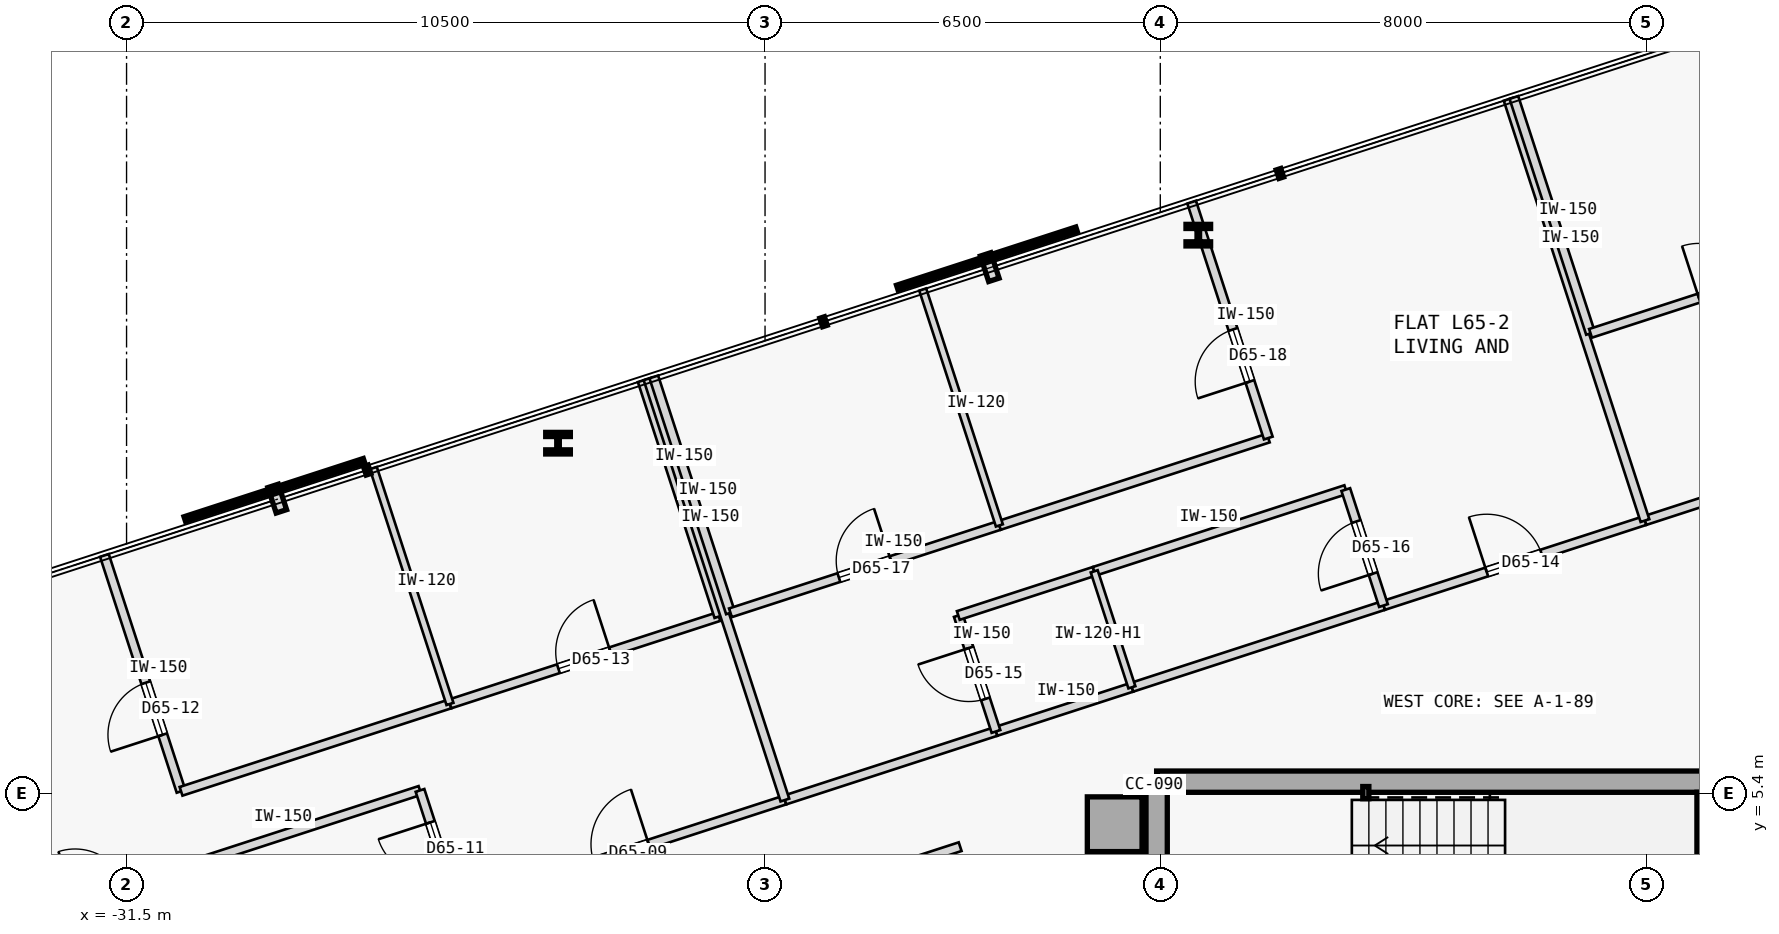
"""IFC4 building model, lengths in metres.
Left out: names, types, materials, properties, quantities, classifications, styles, units other than length and angle.
Written with IfcOpenShell. Run it as: python <this file> out.ifc"""

import sys

from ifc_helpers import new_model, si_unit, direction, frame, frame_2d, origin, origin_2d, place, context, subcontext, project, spatial, rectangle, hollow_rectangle, i_section, extrude, element, fill, save


model = new_model("IFC4")
c1 = context("Model", 3, precision=1e-05, world=origin(), true_north=direction((0.0, 1.0)))
c2 = subcontext(c1, "Body", "Model", "MODEL_VIEW")
j1 = project(units=[si_unit("LENGTHUNIT", "METRE"), si_unit("PLANEANGLEUNIT", "RADIAN")], contexts=[c1])
p1 = place(None, origin())
s1 = spatial("IfcSite", under=j1, at=p1, CompositionType="ELEMENT")
p2 = place(p1, origin())
s2 = spatial("IfcBuilding", under=s1, at=p2, CompositionType="ELEMENT")
p3 = place(p2, frame((0.0, 0.0, 244.4)))
s3 = spatial("IfcBuildingStorey", under=s2, at=p3, CompositionType="ELEMENT", Elevation=244.4)
p4 = place(p3, frame((-15.25, 4.9, 0.0), z_axis=(0.0, 0.0, 1.0), x_axis=(1.0, 0.0, 0.0)))
e1 = element("IfcColumn", 1, at=p4, inside=s3, PredefinedType="COLUMN", context=c2, shape_type="SweptSolid", body=[
    extrude(rectangle(XDim=0.9, YDim=0.9, at=origin_2d()), origin(), (0.0, 0.0, 1.0), 3.35),
])
p5 = place(p3, frame((-14.56, 5.6, 0.0), z_axis=(0.0, 0.0, 1.0), x_axis=(1.0, 0.0, 0.0)))
e2 = element("IfcWall", 2, at=p5, inside=s3, PredefinedType="SHEAR", context=c2, shape_type="SweptSolid", body=[
    extrude(rectangle(XDim=11.41, YDim=0.35, at=frame_2d((5.705, 0.0))), origin(), (0.0, 0.0, 1.0), 3.125),
])
p6 = place(p3, frame((-14.56, -5.425, 0.0), z_axis=(0.0, 0.0, 1.0), x_axis=(0.0, 1.0, 0.0)))
e3 = element("IfcWall", 3, at=p6, inside=s3, PredefinedType="SHEAR", context=c2, shape_type="SweptSolid", body=[
    extrude(rectangle(XDim=10.85, YDim=0.35, at=frame_2d((5.425, 0.0))), origin(), (0.0, 0.0, 1.0), 3.125),
])
p7 = place(p3, frame((-5.5, 2.15, 0.0), z_axis=(0.0, 0.0, 1.0), x_axis=(0.0, 1.0, 0.0)))
e4 = element("IfcWall", 4, at=p7, inside=s3, PredefinedType="SHEAR", context=c2, shape_type="SweptSolid", body=[
    extrude(rectangle(XDim=3.275, YDim=0.35, at=frame_2d((1.638, 0.0))), origin(), (0.0, 0.0, 1.0), 3.125),
])
p8 = place(p3, frame((-11.12, 5.42, 0.0), z_axis=(0.0, 0.0, 1.0), x_axis=(1.0, 0.0, 0.0)))
e5 = element("IfcColumn", 5, at=p8, inside=s3, PredefinedType="COLUMN", context=c2, shape_type="SweptSolid", body=[
    extrude(hollow_rectangle(XDim=0.1, YDim=0.2, WallThickness=0.008, at=origin_2d()), origin(), (0.0, 0.0, 1.0), 3.35),
])
for number, where, z_axis, x_axis in (
    (6, (-13.875, 14.587, 0.0), (0.0, 0.0, 1.0), (1.0, 0.0, 0.0)),
    (7, (-24.404, 11.166, 0.0), (0.0, 0.0, 1.0), (1.0, 0.0, 0.0)),
):
    element("IfcColumn", number, at=place(p3, frame(where, z_axis=z_axis, x_axis=x_axis)), inside=s3, PredefinedType="COLUMN", context=c2, shape_type="SweptSolid", body=[
        extrude(i_section(OverallWidth=0.405, OverallDepth=0.355, WebThickness=0.042, FlangeThickness=0.068, FilletRadius=0.015, at=origin_2d()), origin(), (0.0, 0.0, 1.0), 3.35),
    ])
p9 = place(p3, frame((-26.055, 3.55, 0.0), z_axis=(0.0, 0.0, 1.0), x_axis=(0.951063554534, 0.308995332064, 0.0)))
e8 = element("IfcWall", 8, at=p9, inside=s3, PredefinedType="PARTITIONING", context=c2, shape_type="SweptSolid", body=[
    extrude(rectangle(XDim=5.658, YDim=0.15, at=frame_2d((2.829, 0.0))), origin(), (0.0, 0.0, 1.0), 3.125),
])
p10 = place(p9, frame((2.354, 0.0, 0.0)))
e9 = element("IfcOpeningElement", 9, at=p10, cuts=e8, PredefinedType="OPENING", context=c2, shape_type="SweptSolid", body=[
    extrude(rectangle(XDim=0.95, YDim=2.15, at=frame_2d((0.475, 1.075))), frame((0.0, 0.085, 0.0), z_axis=(0.0, -1.0, 0.0), x_axis=(1.0, 0.0, 0.0)), (0.0, 0.0, 1.0), 0.17),
])
p11 = place(p3, frame((-20.674, 5.298, 0.0), z_axis=(0.0, 0.0, 1.0), x_axis=(0.951057168147, 0.309014988174, 0.0)))
e10 = element("IfcWall", 10, at=p11, inside=s3, PredefinedType="PARTITIONING", context=c2, shape_type="SweptSolid", body=[
    extrude(rectangle(XDim=3.65, YDim=0.15, at=frame_2d((1.825, 0.0))), origin(), (0.0, 0.0, 1.0), 3.125),
])
p12 = place(p3, frame((-10.83, 8.496, 0.0), z_axis=(0.0, 0.0, 1.0), x_axis=(0.951063822327, 0.308994507816, 0.0)))
e11 = element("IfcWall", 11, at=p12, inside=s3, PredefinedType="PARTITIONING", context=c2, shape_type="SweptSolid", body=[
    extrude(rectangle(XDim=4.522, YDim=0.15, at=frame_2d((2.261, 0.0))), origin(), (0.0, 0.0, 1.0), 3.125),
])
p13 = place(p12, frame((1.786, 0.0, 0.0)))
e12 = element("IfcOpeningElement", 12, at=p13, cuts=e11, PredefinedType="OPENING", context=c2, shape_type="SweptSolid", body=[
    extrude(rectangle(XDim=0.95, YDim=2.15, at=frame_2d((0.475, 1.075))), frame((0.0, 0.085, 0.0), z_axis=(0.0, -1.0, 0.0), x_axis=(1.0, 0.0, 0.0)), (0.0, 0.0, 1.0), 0.17),
])
p14 = place(p3, frame((-17.202, 6.426, 0.0), z_axis=(0.0, 0.0, 1.0), x_axis=(0.951035595692, 0.309081373955, 0.0)))
e13 = element("IfcWall", 13, at=p14, inside=s3, PredefinedType="PARTITIONING", context=c2, shape_type="SweptSolid", body=[
    extrude(rectangle(XDim=2.35, YDim=0.15, at=frame_2d((1.175, 0.0))), origin(), (0.0, 0.0, 1.0), 3.125),
])
p15 = place(p3, frame((-14.967, 7.152, 0.0), z_axis=(0.0, 0.0, 1.0), x_axis=(0.951057987102, 0.309012467661, 0.0)))
e14 = element("IfcWall", 14, at=p15, inside=s3, PredefinedType="PARTITIONING", context=c2, shape_type="SweptSolid", body=[
    extrude(rectangle(XDim=4.35, YDim=0.15, at=frame_2d((2.175, 0.0))), origin(), (0.0, 0.0, 1.0), 3.125),
])
p16 = place(p3, frame((-6.53, 9.894, 0.0), z_axis=(0.0, 0.0, 1.0), x_axis=(0.951057168147, 0.309014988174, 0.0)))
e15 = element("IfcWall", 15, at=p16, inside=s3, PredefinedType="PARTITIONING", context=c2, shape_type="SweptSolid", body=[
    extrude(rectangle(XDim=3.65, YDim=0.15, at=frame_2d((1.825, 0.0))), origin(), (0.0, 0.0, 1.0), 3.125),
])
p17 = place(p3, frame((-33.633, -0.616, 0.0), z_axis=(0.0, 0.0, 1.0), x_axis=(0.951058192995, 0.309011833974, 0.0)))
e16 = element("IfcWall", 16, at=p17, inside=s3, PredefinedType="PARTITIONING", context=c2, shape_type="SweptSolid", body=[
    extrude(rectangle(XDim=16.657, YDim=0.15, at=frame_2d((8.329, 0.0))), origin(), (0.0, 0.0, 1.0), 3.125),
])
p18 = place(p17, frame((7.868, 0.0, 0.0)))
e17 = element("IfcOpeningElement", 17, at=p18, cuts=e16, PredefinedType="OPENING", context=c2, shape_type="SweptSolid", body=[
    extrude(rectangle(XDim=0.92, YDim=2.15, at=frame_2d((0.46, 1.075))), frame((0.0, 0.085, 0.0), z_axis=(0.0, -1.0, 0.0), x_axis=(1.0, 0.0, 0.0)), (0.0, 0.0, 1.0), 0.17),
])
p19 = place(p3, frame((-30.811, 4.112, 0.0), z_axis=(0.0, 0.0, 1.0), x_axis=(0.951069122051, 0.308978195154, 0.0)))
e18 = element("IfcWall", 18, at=p19, inside=s3, PredefinedType="PARTITIONING", context=c2, shape_type="SweptSolid", body=[
    extrude(rectangle(XDim=4.35, YDim=0.15, at=frame_2d((2.175, 0.0))), origin(), (0.0, 0.0, 1.0), 3.125),
])
p20 = place(p3, frame((-26.055, 3.55, 0.0), z_axis=(0.0, 0.0, 1.0), x_axis=(-0.309058537449, 0.951043017129, 0.0)))
e19 = element("IfcWall", 19, at=p20, inside=s3, PredefinedType="PARTITIONING", context=c2, shape_type="SweptSolid", body=[
    extrude(rectangle(XDim=2.005, YDim=0.15, at=frame_2d((1.002, 0.0))), origin(), (0.0, 0.0, 1.0), 3.125),
])
p21 = place(p20, frame((0.552, 0.0, 0.0)))
e20 = element("IfcOpeningElement", 20, at=p21, cuts=e19, PredefinedType="OPENING", context=c2, shape_type="SweptSolid", body=[
    extrude(rectangle(XDim=0.9, YDim=2.15, at=frame_2d((0.45, 1.075))), frame((0.0, 0.085, 0.0), z_axis=(0.0, -1.0, 0.0), x_axis=(1.0, 0.0, 0.0)), (0.0, 0.0, 1.0), 0.17),
])
p22 = place(p3, frame((-30.604, 5.441, 0.0), z_axis=(0.0, 0.0, 1.0), x_axis=(-0.309018403393, 0.951056058476, 0.0)))
e21 = element("IfcWall", 21, at=p22, inside=s3, PredefinedType="PARTITIONING", context=c2, shape_type="SweptSolid", body=[
    extrude(rectangle(XDim=4.079, YDim=0.15, at=frame_2d((2.04, 0.0))), origin(), (0.0, 0.0, 1.0), 3.125),
])
p23 = place(p22, frame((0.978, 0.0, 0.0)))
e22 = element("IfcOpeningElement", 22, at=p23, cuts=e21, PredefinedType="OPENING", context=c2, shape_type="SweptSolid", body=[
    extrude(rectangle(XDim=0.9, YDim=2.15, at=frame_2d((0.45, 1.075))), frame((0.0, 0.085, 0.0), z_axis=(0.0, -1.0, 0.0), x_axis=(1.0, 0.0, 0.0)), (0.0, 0.0, 1.0), 0.17),
])
p24 = place(p3, frame((-30.604, 5.441, 0.0), z_axis=(0.0, 0.0, 1.0), x_axis=(0.951070715387, 0.308973290646, 0.0)))
e23 = element("IfcWall", 23, at=p24, inside=s3, PredefinedType="PARTITIONING", context=c2, shape_type="SweptSolid", body=[
    extrude(rectangle(XDim=4.65, YDim=0.15, at=frame_2d((2.325, 0.0))), origin(), (0.0, 0.0, 1.0), 3.125),
])
p25 = place(p3, frame((-26.181, 6.878, 0.0), z_axis=(0.0, 0.0, 1.0), x_axis=(0.951050272606, 0.309036209813, 0.0)))
e24 = element("IfcWall", 24, at=p25, inside=s3, PredefinedType="PARTITIONING", context=c2, shape_type="SweptSolid", body=[
    extrude(rectangle(XDim=4.65, YDim=0.15, at=frame_2d((2.325, 0.0))), origin(), (0.0, 0.0, 1.0), 3.125),
])
p26 = place(p25, frame((1.875, 0.0, 0.0)))
e25 = element("IfcOpeningElement", 25, at=p26, cuts=e24, PredefinedType="OPENING", context=c2, shape_type="SweptSolid", body=[
    extrude(rectangle(XDim=0.9, YDim=2.15, at=frame_2d((0.45, 1.075))), frame((0.0, 0.085, 0.0), z_axis=(0.0, -1.0, 0.0), x_axis=(1.0, 0.0, 0.0)), (0.0, 0.0, 1.0), 0.17),
])
p27 = place(p3, frame((-21.759, 8.315, 0.0), z_axis=(0.0, 0.0, 1.0), x_axis=(-0.309018403393, 0.951056058476, 0.0)))
e26 = element("IfcWall", 26, at=p27, inside=s3, PredefinedType="PARTITIONING", context=c2, shape_type="SweptSolid", body=[
    extrude(rectangle(XDim=4.079, YDim=0.15, at=frame_2d((2.04, 0.0))), origin(), (0.0, 0.0, 1.0), 3.125),
])
p28 = place(p3, frame((-20.674, 5.298, 0.0), z_axis=(0.0, 0.0, 1.0), x_axis=(-0.309029230739, 0.951052540372, 0.0)))
e27 = element("IfcWall", 27, at=p28, inside=s3, PredefinedType="PARTITIONING", context=c2, shape_type="SweptSolid", body=[
    extrude(rectangle(XDim=7.284, YDim=0.15, at=frame_2d((3.642, 0.0))), origin(), (0.0, 0.0, 1.0), 3.125),
])
p29 = place(p3, frame((-26.181, 6.878, 0.0), z_axis=(0.0, 0.0, 1.0), x_axis=(-0.309018403393, 0.951056058476, 0.0)))
e28 = element("IfcWall", 28, at=p29, inside=s3, PredefinedType="PARTITIONING", context=c2, shape_type="SweptSolid", body=[
    extrude(rectangle(XDim=4.079, YDim=0.12, at=frame_2d((2.04, 0.0))), origin(), (0.0, 0.0, 1.0), 3.125),
])
p30 = place(p3, frame((-17.202, 6.426, 0.0), z_axis=(0.0, 0.0, 1.0), x_axis=(-0.309022749039, 0.951054646472, 0.0)))
e29 = element("IfcWall", 29, at=p30, inside=s3, PredefinedType="PARTITIONING", context=c2, shape_type="SweptSolid", body=[
    extrude(rectangle(XDim=2.005, YDim=0.15, at=frame_2d((1.002, 0.0))), origin(), (0.0, 0.0, 1.0), 3.125),
])
p31 = place(p30, frame((0.562, 0.0, 0.0)))
e30 = element("IfcOpeningElement", 30, at=p31, cuts=e29, PredefinedType="OPENING", context=c2, shape_type="SweptSolid", body=[
    extrude(rectangle(XDim=0.88, YDim=2.15, at=frame_2d((0.44, 1.075))), frame((0.0, 0.085, 0.0), z_axis=(0.0, -1.0, 0.0), x_axis=(1.0, 0.0, 0.0)), (0.0, 0.0, 1.0), 0.17),
])
p32 = place(p3, frame((-17.822, 8.333, 0.0), z_axis=(0.0, 0.0, 1.0), x_axis=(0.951066131077, 0.308987401554, 0.0)))
e31 = element("IfcWall", 31, at=p32, inside=s3, PredefinedType="PARTITIONING", context=c2, shape_type="SweptSolid", body=[
    extrude(rectangle(XDim=2.35, YDim=0.15, at=frame_2d((1.175, 0.0))), origin(), (0.0, 0.0, 1.0), 3.125),
])
p33 = place(p3, frame((-15.587, 9.059, 0.0), z_axis=(0.0, 0.0, 1.0), x_axis=(0.951057987102, 0.309012467661, 0.0)))
e32 = element("IfcWall", 32, at=p33, inside=s3, PredefinedType="PARTITIONING", context=c2, shape_type="SweptSolid", body=[
    extrude(rectangle(XDim=4.35, YDim=0.15, at=frame_2d((2.175, 0.0))), origin(), (0.0, 0.0, 1.0), 3.125),
])
p34 = place(p3, frame((-10.83, 8.496, 0.0), z_axis=(0.0, 0.0, 1.0), x_axis=(-0.309058537449, 0.951043017129, 0.0)))
e33 = element("IfcWall", 33, at=p34, inside=s3, PredefinedType="PARTITIONING", context=c2, shape_type="SweptSolid", body=[
    extrude(rectangle(XDim=2.005, YDim=0.15, at=frame_2d((1.002, 0.0))), origin(), (0.0, 0.0, 1.0), 3.125),
])
p35 = place(p34, frame((0.552, 0.0, 0.0)))
e34 = element("IfcOpeningElement", 34, at=p35, cuts=e33, PredefinedType="OPENING", context=c2, shape_type="SweptSolid", body=[
    extrude(rectangle(XDim=0.9, YDim=2.15, at=frame_2d((0.45, 1.075))), frame((0.0, 0.085, 0.0), z_axis=(0.0, -1.0, 0.0), x_axis=(1.0, 0.0, 0.0)), (0.0, 0.0, 1.0), 0.17),
])
p36 = place(p3, frame((-21.569, 8.377, 0.0), z_axis=(0.0, 0.0, 1.0), x_axis=(-0.309018403393, 0.951056058476, 0.0)))
e35 = element("IfcWall", 35, at=p36, inside=s3, PredefinedType="PARTITIONING", context=c2, shape_type="SweptSolid", body=[
    extrude(rectangle(XDim=4.079, YDim=0.15, at=frame_2d((2.04, 0.0))), origin(), (0.0, 0.0, 1.0), 3.125),
])
p37 = place(p3, frame((-21.569, 8.377, 0.0), z_axis=(0.0, 0.0, 1.0), x_axis=(0.951050272606, 0.309036209813, 0.0)))
e36 = element("IfcWall", 36, at=p37, inside=s3, PredefinedType="PARTITIONING", context=c2, shape_type="SweptSolid", body=[
    extrude(rectangle(XDim=4.65, YDim=0.15, at=frame_2d((2.325, 0.0))), origin(), (0.0, 0.0, 1.0), 3.125),
])
p38 = place(p37, frame((1.875, 0.0, 0.0)))
e37 = element("IfcOpeningElement", 37, at=p38, cuts=e36, PredefinedType="OPENING", context=c2, shape_type="SweptSolid", body=[
    extrude(rectangle(XDim=0.9, YDim=2.15, at=frame_2d((0.45, 1.075))), frame((0.0, 0.085, 0.0), z_axis=(0.0, -1.0, 0.0), x_axis=(1.0, 0.0, 0.0)), (0.0, 0.0, 1.0), 0.17),
])
p39 = place(p3, frame((-17.146, 9.814, 0.0), z_axis=(0.0, 0.0, 1.0), x_axis=(0.951065702951, 0.308988719326, 0.0)))
e38 = element("IfcWall", 38, at=p39, inside=s3, PredefinedType="PARTITIONING", context=c2, shape_type="SweptSolid", body=[
    extrude(rectangle(XDim=4.65, YDim=0.15, at=frame_2d((2.325, 0.0))), origin(), (0.0, 0.0, 1.0), 3.125),
])
p40 = place(p3, frame((-12.724, 11.251, 0.0), z_axis=(0.0, 0.0, 1.0), x_axis=(-0.309018403393, 0.951056058476, 0.0)))
e39 = element("IfcWall", 39, at=p40, inside=s3, PredefinedType="PARTITIONING", context=c2, shape_type="SweptSolid", body=[
    extrude(rectangle(XDim=4.079, YDim=0.15, at=frame_2d((2.04, 0.0))), origin(), (0.0, 0.0, 1.0), 3.125),
])
p41 = place(p40, frame((0.978, 0.0, 0.0)))
e40 = element("IfcOpeningElement", 40, at=p41, cuts=e39, PredefinedType="OPENING", context=c2, shape_type="SweptSolid", body=[
    extrude(rectangle(XDim=0.9, YDim=2.15, at=frame_2d((0.45, 1.075))), frame((0.0, 0.085, 0.0), z_axis=(0.0, -1.0, 0.0), x_axis=(1.0, 0.0, 0.0)), (0.0, 0.0, 1.0), 0.17),
])
p42 = place(p3, frame((-6.53, 9.894, 0.0), z_axis=(0.0, 0.0, 1.0), x_axis=(-0.308998913866, 0.951062390819, 0.0)))
e41 = element("IfcWall", 41, at=p42, inside=s3, PredefinedType="PARTITIONING", context=c2, shape_type="SweptSolid", body=[
    extrude(rectangle(XDim=7.284, YDim=0.15, at=frame_2d((3.642, 0.0))), origin(), (0.0, 0.0, 1.0), 3.125),
])
p43 = place(p3, frame((-14.967, 7.152, 0.0), z_axis=(0.0, 0.0, 1.0), x_axis=(-0.309058537449, 0.951043017129, 0.0)))
e42 = element("IfcWall", 42, at=p43, inside=s3, PredefinedType="PARTITIONING", context=c2, shape_type="SweptSolid", body=[
    extrude(rectangle(XDim=2.005, YDim=0.12, at=frame_2d((1.002, 0.0))), origin(), (0.0, 0.0, 1.0), 2.675),
])
p44 = place(p3, frame((-17.146, 9.814, 0.0), z_axis=(0.0, 0.0, 1.0), x_axis=(-0.309018403393, 0.951056058476, 0.0)))
e43 = element("IfcWall", 43, at=p44, inside=s3, PredefinedType="PARTITIONING", context=c2, shape_type="SweptSolid", body=[
    extrude(rectangle(XDim=4.079, YDim=0.12, at=frame_2d((2.04, 0.0))), origin(), (0.0, 0.0, 1.0), 3.125),
])
p45 = place(p3, frame((-7.425, 12.973, 0.0), z_axis=(0.0, 0.0, 1.0), x_axis=(-0.309018403393, 0.951056058476, 0.0)))
e44 = element("IfcWall", 44, at=p45, inside=s3, PredefinedType="PARTITIONING", context=c2, shape_type="SweptSolid", body=[
    extrude(rectangle(XDim=4.079, YDim=0.15, at=frame_2d((2.04, 0.0))), origin(), (0.0, 0.0, 1.0), 3.125),
])
p46 = place(p3, frame((-7.425, 12.973, 0.0), z_axis=(0.0, 0.0, 1.0), x_axis=(0.951055286502, 0.309020779263, 0.0)))
e45 = element("IfcWall", 45, at=p46, inside=s3, PredefinedType="PARTITIONING", context=c2, shape_type="SweptSolid", body=[
    extrude(rectangle(XDim=4.65, YDim=0.15, at=frame_2d((2.325, 0.0))), origin(), (0.0, 0.0, 1.0), 3.125),
])
p47 = place(p46, frame((1.875, 0.0, 0.0)))
e46 = element("IfcOpeningElement", 46, at=p47, cuts=e45, PredefinedType="OPENING", context=c2, shape_type="SweptSolid", body=[
    extrude(rectangle(XDim=0.9, YDim=2.15, at=frame_2d((0.45, 1.075))), frame((0.0, 0.085, 0.0), z_axis=(0.0, -1.0, 0.0), x_axis=(1.0, 0.0, 0.0)), (0.0, 0.0, 1.0), 0.17),
])
p48 = place(p10, origin())
e47 = element("IfcDoor", 47, at=p48, inside=s3, OperationType="SINGLE_SWING_RIGHT", PredefinedType="DOOR", context=c2, shape_type="SweptSolid", body=[
    extrude(rectangle(XDim=0.95, YDim=2.15, at=frame_2d((0.475, 1.075))), frame((0.0, 0.025, 0.0), z_axis=(0.0, -1.0, 0.0), x_axis=(1.0, 0.0, 0.0)), (0.0, 0.0, 1.0), 0.05),
])
fill(e9, e47)
p49 = place(p21, origin())
e48 = element("IfcDoor", 48, at=p49, inside=s3, OperationType="SINGLE_SWING_RIGHT", PredefinedType="DOOR", context=c2, shape_type="SweptSolid", body=[
    extrude(rectangle(XDim=0.9, YDim=2.15, at=frame_2d((0.45, 1.075))), frame((0.0, 0.025, 0.0), z_axis=(0.0, -1.0, 0.0), x_axis=(1.0, 0.0, 0.0)), (0.0, 0.0, 1.0), 0.05),
])
fill(e20, e48)
p50 = place(p23, origin())
e49 = element("IfcDoor", 49, at=p50, inside=s3, OperationType="SINGLE_SWING_LEFT", PredefinedType="DOOR", context=c2, shape_type="SweptSolid", body=[
    extrude(rectangle(XDim=0.9, YDim=2.15, at=frame_2d((0.45, 1.075))), frame((0.0, 0.025, 0.0), z_axis=(0.0, -1.0, 0.0), x_axis=(1.0, 0.0, 0.0)), (0.0, 0.0, 1.0), 0.05),
])
fill(e22, e49)
p51 = place(p26, origin())
e50 = element("IfcDoor", 50, at=p51, inside=s3, OperationType="SINGLE_SWING_RIGHT", PredefinedType="DOOR", context=c2, shape_type="SweptSolid", body=[
    extrude(rectangle(XDim=0.9, YDim=2.15, at=frame_2d((0.45, 1.075))), frame((0.0, 0.025, 0.0), z_axis=(0.0, -1.0, 0.0), x_axis=(1.0, 0.0, 0.0)), (0.0, 0.0, 1.0), 0.05),
])
fill(e25, e50)
p52 = place(p13, origin())
e51 = element("IfcDoor", 51, at=p52, inside=s3, OperationType="SINGLE_SWING_LEFT", PredefinedType="DOOR", context=c2, shape_type="SweptSolid", body=[
    extrude(rectangle(XDim=0.95, YDim=2.15, at=frame_2d((0.475, 1.075))), frame((0.0, 0.025, 0.0), z_axis=(0.0, -1.0, 0.0), x_axis=(1.0, 0.0, 0.0)), (0.0, 0.0, 1.0), 0.05),
])
fill(e12, e51)
p53 = place(p31, origin())
e52 = element("IfcDoor", 52, at=p53, inside=s3, OperationType="SINGLE_SWING_RIGHT", PredefinedType="DOOR", context=c2, shape_type="SweptSolid", body=[
    extrude(rectangle(XDim=0.88, YDim=2.15, at=frame_2d((0.44, 1.075))), frame((0.0, 0.025, 0.0), z_axis=(0.0, -1.0, 0.0), x_axis=(1.0, 0.0, 0.0)), (0.0, 0.0, 1.0), 0.05),
])
fill(e30, e52)
p54 = place(p35, origin())
e53 = element("IfcDoor", 53, at=p54, inside=s3, OperationType="SINGLE_SWING_LEFT", PredefinedType="DOOR", context=c2, shape_type="SweptSolid", body=[
    extrude(rectangle(XDim=0.9, YDim=2.15, at=frame_2d((0.45, 1.075))), frame((0.0, 0.025, 0.0), z_axis=(0.0, -1.0, 0.0), x_axis=(1.0, 0.0, 0.0)), (0.0, 0.0, 1.0), 0.05),
])
fill(e34, e53)
p55 = place(p38, origin())
e54 = element("IfcDoor", 54, at=p55, inside=s3, OperationType="SINGLE_SWING_RIGHT", PredefinedType="DOOR", context=c2, shape_type="SweptSolid", body=[
    extrude(rectangle(XDim=0.9, YDim=2.15, at=frame_2d((0.45, 1.075))), frame((0.0, 0.025, 0.0), z_axis=(0.0, -1.0, 0.0), x_axis=(1.0, 0.0, 0.0)), (0.0, 0.0, 1.0), 0.05),
])
fill(e37, e54)
p56 = place(p41, origin())
e55 = element("IfcDoor", 55, at=p56, inside=s3, OperationType="SINGLE_SWING_LEFT", PredefinedType="DOOR", context=c2, shape_type="SweptSolid", body=[
    extrude(rectangle(XDim=0.9, YDim=2.15, at=frame_2d((0.45, 1.075))), frame((0.0, 0.025, 0.0), z_axis=(0.0, -1.0, 0.0), x_axis=(1.0, 0.0, 0.0)), (0.0, 0.0, 1.0), 0.05),
])
fill(e40, e55)
p57 = place(p47, origin())
e56 = element("IfcDoor", 56, at=p57, inside=s3, OperationType="SINGLE_SWING_LEFT", PredefinedType="DOOR", context=c2, shape_type="SweptSolid", body=[
    extrude(rectangle(XDim=0.9, YDim=2.15, at=frame_2d((0.45, 1.075))), frame((0.0, 0.025, 0.0), z_axis=(0.0, -1.0, 0.0), x_axis=(1.0, 0.0, 0.0)), (0.0, 0.0, 1.0), 0.05),
])
fill(e46, e56)
save(model, sys.argv[1])
